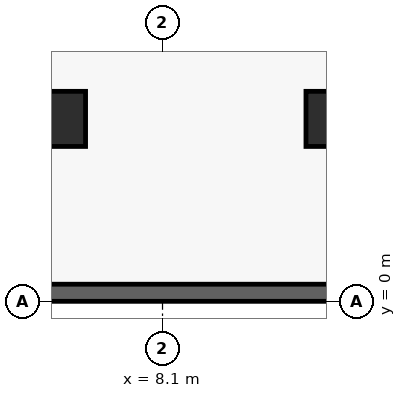
"""IFC4 building model, lengths in metres.
Left out: names, types, materials, properties, quantities, classifications, styles, units other than length and angle.
Written with IfcOpenShell. Run it as: python <this file> out.ifc"""

import sys

from ifc_helpers import new_model, si_unit, direction, frame, frame_2d, origin, origin_2d, place, context, subcontext, project, spatial, rectangle, extrude, source, transform, mapped, element, save


model = new_model("IFC4")
c1 = context("Model", 3, precision=1e-05, world=origin(), true_north=direction((0.0, 1.0)))
c2 = subcontext(c1, "Body", "Model", "MODEL_VIEW")
j1 = project(units=[si_unit("LENGTHUNIT", "METRE"), si_unit("PLANEANGLEUNIT", "RADIAN")], contexts=[c1])
p1 = place(None, origin())
s1 = spatial("IfcSite", under=j1, at=p1, CompositionType="ELEMENT")
p2 = place(p1, origin())
s2 = spatial("IfcBuilding", under=s1, at=p2, CompositionType="ELEMENT")
p3 = place(p2, frame((0.0, 0.0, -10.8)))
s3 = spatial("IfcBuildingStorey", under=s2, at=p3, CompositionType="ELEMENT", Elevation=-10.8)
p4 = place(p3, frame((0.225, 0.225, 0.0), z_axis=(0.0, 0.0, 1.0), x_axis=(1.0, 0.0, 0.0)))
e1 = element("IfcWall", 1, at=p4, inside=s3, PredefinedType="USERDEFINED", context=c2, shape_type="SweptSolid", body=[
    extrude(rectangle(XDim=64.35, YDim=0.45, at=frame_2d((32.175, 0.0))), origin(), (0.0, 0.0, 1.0), 3.238),
])
m1 = source(origin(), c2, "Body", "SweptSolid", [
    extrude(rectangle(XDim=1.45, YDim=1.45, at=origin_2d()), origin(), (0.0, 0.0, 1.0), 3.24),
])
for number, where, z_axis, x_axis in (
    (2, (12.6, 4.8, 0.0), (0.0, 0.0, 1.0), (1.0, 0.0, 0.0)),
    (3, (5.35, 4.8, 0.0), (0.0, 0.0, 1.0), (1.0, 0.0, 0.0)),
):
    element("IfcColumn", number, at=place(p3, frame(where, z_axis=z_axis, x_axis=x_axis)), inside=s3, PredefinedType="COLUMN", context=c2, shape_type="MappedRepresentation", body=[
        mapped(m1, transform((0.0, 0.0, 0.0), scale=1.0)),
    ])
save(model, sys.argv[1])
